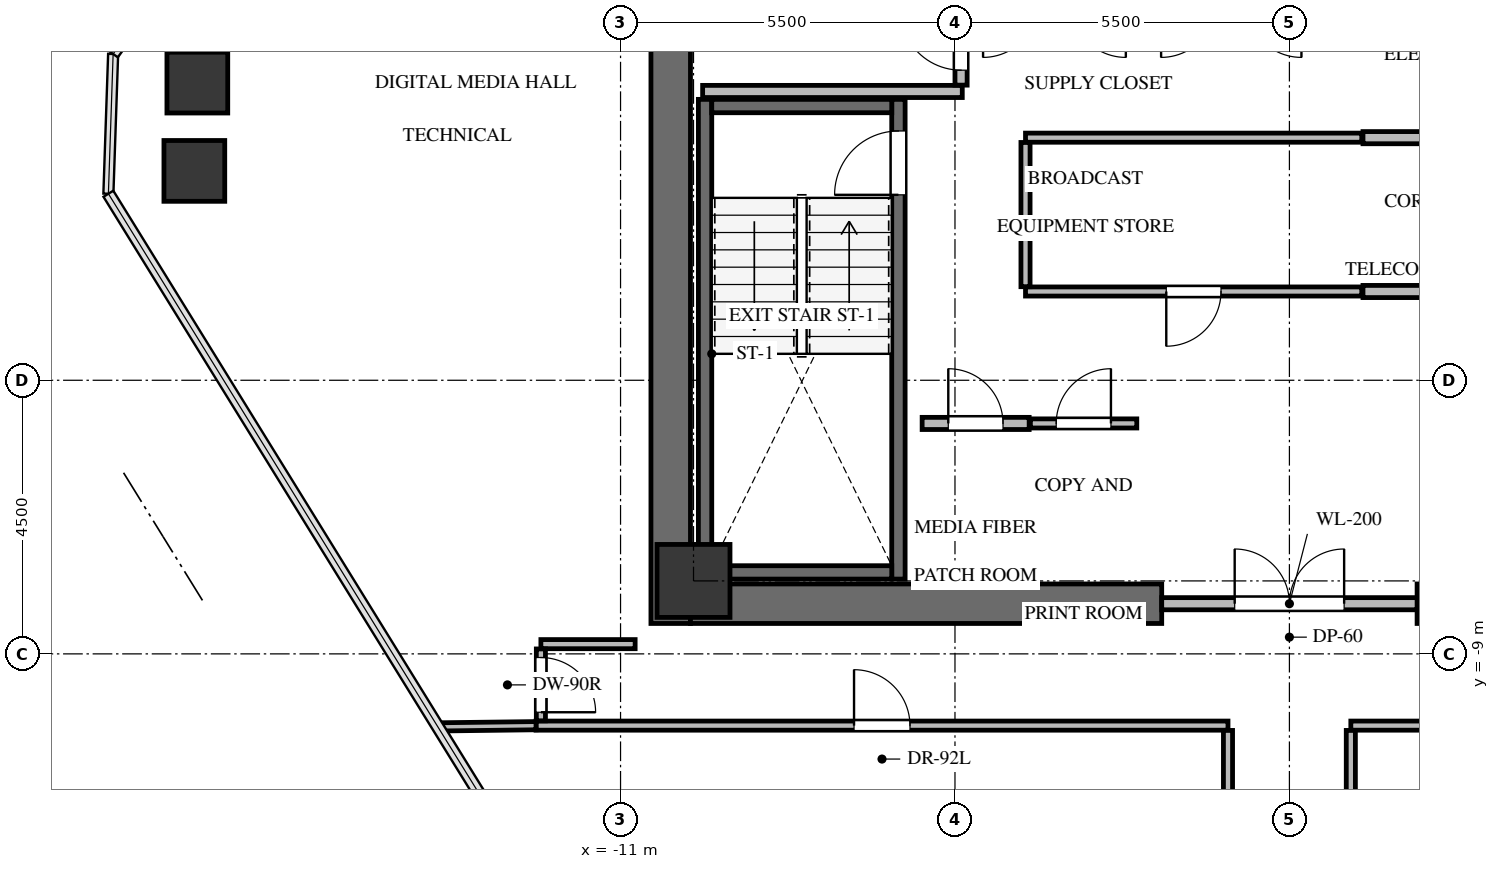
"""IFC4 building model, lengths in metres.
Left out: names, types, materials, properties, quantities, classifications, styles, units other than length and angle.
Written with IfcOpenShell. Run it as: python <this file> out.ifc"""

import sys

from ifc_helpers import new_model, si_unit, direction, frame, frame_2d, origin, origin_2d, place, context, subcontext, project, spatial, rectangle, extrude, source, transform, mapped, element, fill, save


model = new_model("IFC4")
c1 = context("Model", 3, precision=1e-05, world=origin(), true_north=direction((0.0, 1.0)))
c2 = subcontext(c1, "Body", "Model", "MODEL_VIEW")
j1 = project(units=[si_unit("LENGTHUNIT", "METRE"), si_unit("PLANEANGLEUNIT", "RADIAN")], contexts=[c1])
p1 = place(None, origin())
s1 = spatial("IfcSite", under=j1, at=p1, CompositionType="ELEMENT")
p2 = place(p1, origin())
s2 = spatial("IfcBuilding", under=s1, at=p2, CompositionType="ELEMENT")
p3 = place(p2, frame((0.0, 0.0, 167.2)))
s3 = spatial("IfcBuildingStorey", under=s2, at=p3, CompositionType="ELEMENT", Elevation=167.2)
p4 = place(p3, frame((-10.175, -8.5, 0.0), z_axis=(0.0, 0.0, 1.0), x_axis=(0.0, 1.0, 0.0)))
e1 = element("IfcWall", 1, at=p4, inside=s3, PredefinedType="SHEAR", context=c2, shape_type="SweptSolid", body=[
    extrude(rectangle(XDim=17.0, YDim=0.65, at=frame_2d((8.5, 0.0))), origin(), (0.0, 0.0, 1.0), 3.3),
])
for number, where, z_axis, x_axis in (
    (2, (-9.85, -8.175, 0.0), (0.0, 0.0, 1.0), (1.0, 0.0, 0.0)),
    (3, (2.1, -8.175, 0.0), (0.0, 0.0, 1.0), (1.0, 0.0, 0.0)),
):
    element("IfcWall", number, at=place(p3, frame(where, z_axis=z_axis, x_axis=x_axis)), inside=s3, PredefinedType="SHEAR", context=c2, shape_type="SweptSolid", body=[
        extrude(rectangle(XDim=7.75, YDim=0.65, at=frame_2d((3.875, 0.0))), origin(), (0.0, 0.0, 1.0), 3.3),
    ])
p5 = place(p3, frame((-6.43, -7.77, -0.24), z_axis=(0.0, 0.0, 1.0), x_axis=(0.0, 1.0, 0.0)))
e4 = element("IfcWall", 4, at=p5, inside=s3, PredefinedType="SHEAR", context=c2, shape_type="SweptSolid", body=[
    extrude(rectangle(XDim=7.89, YDim=0.22, at=frame_2d((3.945, 0.0))), origin(), (0.0, 0.0, 1.0), 3.3),
])
p6 = place(p5, frame((6.32, 0.0, 0.0)))
e5 = element("IfcOpeningElement", 5, at=p6, cuts=e4, PredefinedType="OPENING", context=c2, shape_type="SweptSolid", body=[
    extrude(rectangle(XDim=1.05, YDim=2.15, at=frame_2d((0.525, 1.075))), frame((0.0, 0.12, 0.0), z_axis=(0.0, -1.0, 0.0), x_axis=(1.0, 0.0, 0.0)), (0.0, 0.0, 1.0), 0.24),
])
p7 = place(p3, frame((-9.61, 0.12, -0.24), z_axis=(0.0, 0.0, 1.0), x_axis=(0.0, -1.0, 0.0)))
e6 = element("IfcWall", 6, at=p7, inside=s3, PredefinedType="SHEAR", context=c2, shape_type="SweptSolid", body=[
    extrude(rectangle(XDim=7.89, YDim=0.22, at=frame_2d((3.945, 0.0))), origin(), (0.0, 0.0, 1.0), 3.3),
])
for number, where, z_axis, x_axis in (
    (7, (-9.5, -7.66, -0.24), (0.0, 0.0, 1.0), (1.0, 0.0, 0.0)),
    (8, (-6.54, 0.01, -0.24), (0.0, 0.0, 1.0), (-1.0, 0.0, 0.0)),
):
    element("IfcWall", number, at=place(p3, frame(where, z_axis=z_axis, x_axis=x_axis)), inside=s3, PredefinedType="SHEAR", context=c2, shape_type="SweptSolid", body=[
        extrude(rectangle(XDim=2.96, YDim=0.22, at=frame_2d((1.48, 0.0))), origin(), (0.0, 0.0, 1.0), 3.3),
    ])
m1 = source(origin(), c2, "Body", "SweptSolid", [
    extrude(rectangle(XDim=1.2, YDim=1.2, at=origin_2d()), origin(), (0.0, 0.0, 1.0), 3.3),
])
p8 = place(p3, frame((-9.8, -7.8, -0.24), z_axis=(0.0, 0.0, 1.0), x_axis=(1.0, 0.0, 0.0)))
e9 = element("IfcColumn", 9, at=p8, inside=s3, PredefinedType="COLUMN", context=c2, shape_type="MappedRepresentation", body=[
    mapped(m1, transform((0.0, 0.0, 0.0), x_axis=(1.0, 0.0, 0.0), y_axis=(0.0, 1.0, 0.0), z_axis=(0.0, 0.0, 1.0), scale=1.0)),
])
m2 = source(origin(), c2, "Body", "SweptSolid", [
    extrude(rectangle(XDim=1.0, YDim=1.0, at=origin_2d()), origin(), (0.0, 0.0, 1.0), 3.3),
])
for number, where, z_axis, x_axis in (
    (10, (-18.009, -1.057, -0.24), (0.0, 0.0, 1.0), (1.0, 0.0, 0.0)),
    (11, (-17.96, 0.396, -0.24), (0.0, 0.0, 1.0), (1.0, 0.0, 0.0)),
):
    element("IfcColumn", number, at=place(p3, frame(where, z_axis=z_axis, x_axis=x_axis)), inside=s3, PredefinedType="COLUMN", context=c2, shape_type="MappedRepresentation", body=[
        mapped(m2, transform((0.0, 0.0, 0.0), x_axis=(1.0, 0.0, 0.0), y_axis=(0.0, 1.0, 0.0), z_axis=(0.0, 0.0, 1.0), scale=1.0)),
    ])
p9 = place(p3, frame((-2.1, -8.175, 0.0), z_axis=(0.0, 0.0, 1.0), x_axis=(1.0, 0.0, 0.0)))
e12 = element("IfcWall", 12, at=p9, inside=s3, PredefinedType="SOLIDWALL", context=c2, shape_type="SweptSolid", body=[
    extrude(rectangle(XDim=4.2, YDim=0.2, at=frame_2d((2.1, 0.0))), origin(), (0.0, 0.0, 1.0), 3.045),
])
p10 = place(p9, frame((1.2, 0.0, 0.0)))
e13 = element("IfcOpeningElement", 13, at=p10, cuts=e12, PredefinedType="OPENING", context=c2, shape_type="SweptSolid", body=[
    extrude(rectangle(XDim=1.8, YDim=2.15, at=frame_2d((0.9, 1.075))), frame((0.0, 0.11, 0.0), z_axis=(0.0, -1.0, 0.0), x_axis=(1.0, 0.0, 0.0)), (0.0, 0.0, 1.0), 0.22),
])
p11 = place(p3, frame((-9.65, 0.25, 0.0), z_axis=(0.0, 0.0, 1.0), x_axis=(1.0, 0.0, 0.0)))
e14 = element("IfcWall", 14, at=p11, inside=s3, PredefinedType="SOLIDWALL", context=c2, shape_type="SweptSolid", body=[
    extrude(rectangle(XDim=4.27, YDim=0.2, at=frame_2d((2.135, 0.0))), origin(), (0.0, 0.0, 1.0), 3.045),
])
p12 = place(p3, frame((-5.4, 0.354, 0.0), z_axis=(0.0, 0.0, 1.0), x_axis=(0.0, 1.0, 0.0)))
e15 = element("IfcWall", 15, at=p12, inside=s3, PredefinedType="SOLIDWALL", context=c2, shape_type="SweptSolid", body=[
    extrude(rectangle(XDim=4.026, YDim=0.2, at=frame_2d((2.013, 0.0))), origin(), (0.0, 0.0, 1.0), 3.045),
])
p13 = place(p12, frame((0.246, 0.0, 0.0)))
e16 = element("IfcOpeningElement", 16, at=p13, cuts=e15, PredefinedType="OPENING", context=c2, shape_type="SweptSolid", body=[
    extrude(rectangle(XDim=1.0, YDim=2.15, at=frame_2d((0.5, 1.075))), frame((0.0, 0.11, 0.0), z_axis=(0.0, -1.0, 0.0), x_axis=(1.0, 0.0, 0.0)), (0.0, 0.0, 1.0), 0.22),
])
p14 = place(p3, frame((-6.04, -5.21, 0.0), z_axis=(0.0, 0.0, 1.0), x_axis=(1.0, 0.0, 0.0)))
e17 = element("IfcWall", 17, at=p14, inside=s3, PredefinedType="SOLIDWALL", context=c2, shape_type="SweptSolid", body=[
    extrude(rectangle(XDim=1.76, YDim=0.2, at=frame_2d((0.88, 0.0))), origin(), (0.0, 0.0, 1.0), 3.045),
])
p15 = place(p14, frame((0.43, 0.0, 0.0)))
e18 = element("IfcOpeningElement", 18, at=p15, cuts=e17, PredefinedType="OPENING", context=c2, shape_type="SweptSolid", body=[
    extrude(rectangle(XDim=0.9, YDim=2.05, at=frame_2d((0.45, 1.025))), frame((0.0, 0.11, 0.0), z_axis=(0.0, -1.0, 0.0), x_axis=(1.0, 0.0, 0.0)), (0.0, 0.0, 1.0), 0.22),
])
p16 = place(p3, frame((-4.26, -5.21, 0.0), z_axis=(0.0, 0.0, 1.0), x_axis=(1.0, 0.0, 0.0)))
e19 = element("IfcWall", 19, at=p16, inside=s3, PredefinedType="PARTITIONING", context=c2, shape_type="SweptSolid", body=[
    extrude(rectangle(XDim=1.75, YDim=0.15, at=frame_2d((0.875, 0.0))), origin(), (0.0, 0.0, 1.0), 3.045),
])
p17 = place(p16, frame((0.425, 0.0, 0.0)))
e20 = element("IfcOpeningElement", 20, at=p17, cuts=e19, PredefinedType="OPENING", context=c2, shape_type="SweptSolid", body=[
    extrude(rectangle(XDim=0.9, YDim=2.05, at=frame_2d((0.45, 1.025))), frame((0.0, 0.085, 0.0), z_axis=(0.0, -1.0, 0.0), x_axis=(1.0, 0.0, 0.0)), (0.0, 0.0, 1.0), 0.17),
])
p18 = place(p3, frame((1.19, -3.04, 0.0), z_axis=(0.0, 0.0, 1.0), x_axis=(-1.0, 0.0, 0.0)))
e21 = element("IfcWall", 21, at=p18, inside=s3, PredefinedType="PARTITIONING", context=c2, shape_type="SweptSolid", body=[
    extrude(rectangle(XDim=5.53, YDim=0.15, at=frame_2d((2.765, 0.0))), origin(), (0.0, 0.0, 1.0), 3.045),
])
p19 = place(p18, frame((2.315, 0.0, 0.0)))
e22 = element("IfcOpeningElement", 22, at=p19, cuts=e21, PredefinedType="OPENING", context=c2, shape_type="SweptSolid", body=[
    extrude(rectangle(XDim=0.9, YDim=2.05, at=frame_2d((0.45, 1.025))), frame((0.0, 0.085, 0.0), z_axis=(0.0, -1.0, 0.0), x_axis=(1.0, 0.0, 0.0)), (0.0, 0.0, 1.0), 0.17),
])
p20 = place(p3, frame((-4.34, -0.51, 0.0), z_axis=(0.0, 0.0, 1.0), x_axis=(1.0, 0.0, 0.0)))
e23 = element("IfcWall", 23, at=p20, inside=s3, PredefinedType="PARTITIONING", context=c2, shape_type="SweptSolid", body=[
    extrude(rectangle(XDim=5.53, YDim=0.15, at=frame_2d((2.765, 0.0))), origin(), (0.0, 0.0, 1.0), 3.045),
])
p21 = place(p3, frame((-4.34, -2.961, 0.0), z_axis=(0.0, 0.0, 1.0), x_axis=(0.0, 1.0, 0.0)))
e24 = element("IfcWall", 24, at=p21, inside=s3, PredefinedType="PARTITIONING", context=c2, shape_type="SweptSolid", body=[
    extrude(rectangle(XDim=2.372, YDim=0.15, at=frame_2d((1.186, 0.0))), origin(), (0.0, 0.0, 1.0), 3.045),
])
for number, where, z_axis, x_axis in (
    (25, (3.036, -3.04, 0.0), (0.0, 0.0, 1.0), (-1.0, 0.0, 0.0)),
    (26, (1.21, -0.51, 0.0), (0.0, 0.0, 1.0), (1.0, 0.0, 0.0)),
):
    element("IfcWall", number, at=place(p3, frame(where, z_axis=z_axis, x_axis=x_axis)), inside=s3, PredefinedType="SOLIDWALL", context=c2, shape_type="SweptSolid", body=[
        extrude(rectangle(XDim=1.826, YDim=0.2, at=frame_2d((0.913, 0.0))), origin(), (0.0, 0.0, 1.0), 3.045),
    ])
p22 = place(p3, frame((-12.39, -10.18, 0.0), z_axis=(0.0, 0.0, 1.0), x_axis=(1.0, 0.0, 0.0)))
e27 = element("IfcWall", 27, at=p22, inside=s3, PredefinedType="PARTITIONING", context=c2, shape_type="SweptSolid", body=[
    extrude(rectangle(XDim=11.38, YDim=0.15, at=frame_2d((5.69, 0.0))), origin(), (0.0, 0.0, 1.0), 2.242),
])
p23 = place(p22, frame((5.23, 0.0, 0.0)))
e28 = element("IfcOpeningElement", 28, at=p23, cuts=e27, PredefinedType="OPENING", context=c2, shape_type="SweptSolid", body=[
    extrude(rectangle(XDim=0.92, YDim=2.1, at=frame_2d((0.46, 1.05))), frame((0.0, 0.085, 0.0), z_axis=(0.0, -1.0, 0.0), x_axis=(1.0, 0.0, 0.0)), (0.0, 0.0, 1.0), 0.17),
])
p24 = place(p3, frame((-1.01, -10.259, 0.0), z_axis=(0.0, 0.0, 1.0), x_axis=(0.0, -1.0, 0.0)))
e29 = element("IfcWall", 29, at=p24, inside=s3, PredefinedType="PARTITIONING", context=c2, shape_type="SweptSolid", body=[
    extrude(rectangle(XDim=7.683, YDim=0.15, at=frame_2d((3.841, 0.0))), origin(), (0.0, 0.0, 1.0), 2.399),
])
p25 = place(p3, frame((1.01, -10.18, 0.0), z_axis=(0.0, 0.0, 1.0), x_axis=(1.0, 0.0, 0.0)))
e30 = element("IfcWall", 30, at=p25, inside=s3, PredefinedType="PARTITIONING", context=c2, shape_type="SweptSolid", body=[
    extrude(rectangle(XDim=11.25, YDim=0.15, at=frame_2d((5.625, 0.0))), origin(), (0.0, 0.0, 1.0), 2.242),
])
p26 = place(p25, frame((5.15, 0.0, 0.0)))
e31 = element("IfcOpeningElement", 31, at=p26, cuts=e30, PredefinedType="OPENING", context=c2, shape_type="SweptSolid", body=[
    extrude(rectangle(XDim=0.95, YDim=2.1, at=frame_2d((0.475, 1.05))), frame((0.0, 0.085, 0.0), z_axis=(0.0, -1.0, 0.0), x_axis=(1.0, 0.0, 0.0)), (0.0, 0.0, 1.0), 0.17),
])
p27 = place(p3, frame((1.01, -17.942, 0.0), z_axis=(0.0, 0.0, 1.0), x_axis=(0.0, 1.0, 0.0)))
e32 = element("IfcWall", 32, at=p27, inside=s3, PredefinedType="PARTITIONING", context=c2, shape_type="SweptSolid", body=[
    extrude(rectangle(XDim=7.683, YDim=0.15, at=frame_2d((3.841, 0.0))), origin(), (0.0, 0.0, 1.0), 2.399),
])
p28 = place(p3, frame((-10.76, -8.84, 0.0), z_axis=(0.0, 0.0, 1.0), x_axis=(-1.0, 0.0, 0.0)))
e33 = element("IfcWall", 33, at=p28, inside=s3, PredefinedType="PARTITIONING", context=c2, shape_type="SweptSolid", body=[
    extrude(rectangle(XDim=1.55, YDim=0.15, at=frame_2d((0.775, 0.0))), origin(), (0.0, 0.0, 1.0), 3.045),
])
p29 = place(p3, frame((-12.31, -8.919, 0.0), z_axis=(0.0, 0.0, 1.0), x_axis=(0.0, -1.0, 0.0)))
e34 = element("IfcWall", 34, at=p29, inside=s3, PredefinedType="PARTITIONING", context=c2, shape_type="SweptSolid", body=[
    extrude(rectangle(XDim=1.182, YDim=0.15, at=frame_2d((0.591, 0.0))), origin(), (0.0, 0.0, 1.0), 2.399),
])
p30 = place(p29, frame((0.141, 0.0, 0.0)))
e35 = element("IfcOpeningElement", 35, at=p30, cuts=e34, PredefinedType="OPENING", context=c2, shape_type="SweptSolid", body=[
    extrude(rectangle(XDim=0.9, YDim=2.05, at=frame_2d((0.45, 1.025))), frame((0.0, 0.085, 0.0), z_axis=(0.0, -1.0, 0.0), x_axis=(1.0, 0.0, 0.0)), (0.0, 0.0, 1.0), 0.17),
])
p31 = place(p3, frame((-14.004, -10.201, 0.0), z_axis=(0.0, 0.0, 1.0), x_axis=(0.999923084603, 0.012402615782, 0.0)))
e36 = element("IfcWall", 36, at=p31, inside=s3, PredefinedType="PARTITIONING", context=c2, shape_type="SweptSolid", body=[
    extrude(rectangle(XDim=1.614, YDim=0.135, at=frame_2d((0.807, 0.0))), origin(), (0.0, 0.0, 1.0), 2.399),
])
m3 = source(origin(), c2, "Body", "SweptSolid", [
    extrude(rectangle(XDim=1.05, YDim=2.15, at=frame_2d((0.525, 1.075))), frame((0.0, 0.025, 0.0), z_axis=(0.0, -1.0, 0.0), x_axis=(1.0, 0.0, 0.0)), (0.0, 0.0, 1.0), 0.05),
])
p32 = place(p6, origin())
e37 = element("IfcDoor", 37, at=p32, inside=s3, OperationType="SINGLE_SWING_LEFT", PredefinedType="DOOR", context=c2, shape_type="MappedRepresentation", body=[
    mapped(m3, transform((0.0, 0.0, 0.0), x_axis=(1.0, 0.0, 0.0), y_axis=(0.0, 1.0, 0.0), z_axis=(0.0, 0.0, 1.0), scale=1.0)),
])
fill(e5, e37)
m4 = source(origin(), c2, "Body", "SweptSolid", [
    extrude(rectangle(XDim=1.8, YDim=2.15, at=frame_2d((0.9, 1.075))), frame((0.0, 0.025, 0.0), z_axis=(0.0, -1.0, 0.0), x_axis=(1.0, 0.0, 0.0)), (0.0, 0.0, 1.0), 0.05),
])
p33 = place(p10, origin())
e38 = element("IfcDoor", 38, at=p33, inside=s3, OperationType="DOUBLE_DOOR_SINGLE_SWING", PredefinedType="DOOR", context=c2, shape_type="MappedRepresentation", body=[
    mapped(m4, transform((0.0, 0.0, 0.0), x_axis=(1.0, 0.0, 0.0), y_axis=(0.0, 1.0, 0.0), z_axis=(0.0, 0.0, 1.0), scale=1.0)),
])
fill(e13, e38)
m5 = source(origin(), c2, "Body", "SweptSolid", [
    extrude(rectangle(XDim=1.0, YDim=2.15, at=frame_2d((0.5, 1.075))), frame((0.0, 0.025, 0.0), z_axis=(0.0, -1.0, 0.0), x_axis=(1.0, 0.0, 0.0)), (0.0, 0.0, 1.0), 0.05),
])
p34 = place(p13, origin())
e39 = element("IfcDoor", 39, at=p34, inside=s3, OperationType="SINGLE_SWING_RIGHT", PredefinedType="DOOR", context=c2, shape_type="MappedRepresentation", body=[
    mapped(m5, transform((0.0, 0.0, 0.0), x_axis=(1.0, 0.0, 0.0), y_axis=(0.0, 1.0, 0.0), z_axis=(0.0, 0.0, 1.0), scale=1.0)),
])
fill(e16, e39)
m6 = source(origin(), c2, "Body", "SweptSolid", [
    extrude(rectangle(XDim=0.9, YDim=2.05, at=frame_2d((0.45, 1.025))), frame((0.0, 0.025, 0.0), z_axis=(0.0, -1.0, 0.0), x_axis=(1.0, 0.0, 0.0)), (0.0, 0.0, 1.0), 0.05),
])
p35 = place(p15, origin())
e40 = element("IfcDoor", 40, at=p35, inside=s3, OperationType="SINGLE_SWING_LEFT", PredefinedType="DOOR", context=c2, shape_type="MappedRepresentation", body=[
    mapped(m6, transform((0.0, 0.0, 0.0), x_axis=(1.0, 0.0, 0.0), y_axis=(0.0, 1.0, 0.0), z_axis=(0.0, 0.0, 1.0), scale=1.0)),
])
fill(e18, e40)
m7 = source(origin(), c2, "Body", "SweptSolid", [
    extrude(rectangle(XDim=0.9, YDim=2.05, at=frame_2d((0.45, 1.025))), frame((0.0, 0.025, 0.0), z_axis=(0.0, -1.0, 0.0), x_axis=(1.0, 0.0, 0.0)), (0.0, 0.0, 1.0), 0.05),
])
p36 = place(p17, origin())
e41 = element("IfcDoor", 41, at=p36, inside=s3, OperationType="SINGLE_SWING_RIGHT", PredefinedType="DOOR", context=c2, shape_type="MappedRepresentation", body=[
    mapped(m7, transform((0.0, 0.0, 0.0), x_axis=(1.0, 0.0, 0.0), y_axis=(0.0, 1.0, 0.0), z_axis=(0.0, 0.0, 1.0), scale=1.0)),
])
fill(e20, e41)
p37 = place(p19, origin())
e42 = element("IfcDoor", 42, at=p37, inside=s3, OperationType="SINGLE_SWING_RIGHT", PredefinedType="DOOR", context=c2, shape_type="MappedRepresentation", body=[
    mapped(m7, transform((0.0, 0.0, 0.0), x_axis=(1.0, 0.0, 0.0), y_axis=(0.0, 1.0, 0.0), z_axis=(0.0, 0.0, 1.0), scale=1.0)),
])
fill(e22, e42)
m8 = source(origin(), c2, "Body", "SweptSolid", [
    extrude(rectangle(XDim=0.92, YDim=2.1, at=frame_2d((0.46, 1.05))), frame((0.0, 0.025, 0.0), z_axis=(0.0, -1.0, 0.0), x_axis=(1.0, 0.0, 0.0)), (0.0, 0.0, 1.0), 0.05),
])
p38 = place(p23, origin())
e43 = element("IfcDoor", 43, at=p38, inside=s3, OperationType="SINGLE_SWING_LEFT", PredefinedType="DOOR", context=c2, shape_type="MappedRepresentation", body=[
    mapped(m8, transform((0.0, 0.0, 0.0), x_axis=(1.0, 0.0, 0.0), y_axis=(0.0, 1.0, 0.0), z_axis=(0.0, 0.0, 1.0), scale=1.0)),
])
fill(e28, e43)
m9 = source(origin(), c2, "Body", "SweptSolid", [
    extrude(rectangle(XDim=0.9, YDim=2.05, at=frame_2d((0.45, 1.025))), frame((0.0, 0.025, 0.0), z_axis=(0.0, -1.0, 0.0), x_axis=(1.0, 0.0, 0.0)), (0.0, 0.0, 1.0), 0.05),
])
p39 = place(p30, origin())
e44 = element("IfcDoor", 44, at=p39, inside=s3, OperationType="SINGLE_SWING_RIGHT", PredefinedType="DOOR", context=c2, shape_type="MappedRepresentation", body=[
    mapped(m9, transform((0.0, 0.0, 0.0), x_axis=(1.0, 0.0, 0.0), y_axis=(0.0, 1.0, 0.0), z_axis=(0.0, 0.0, 1.0), scale=1.0)),
])
fill(e35, e44)
save(model, sys.argv[1])
